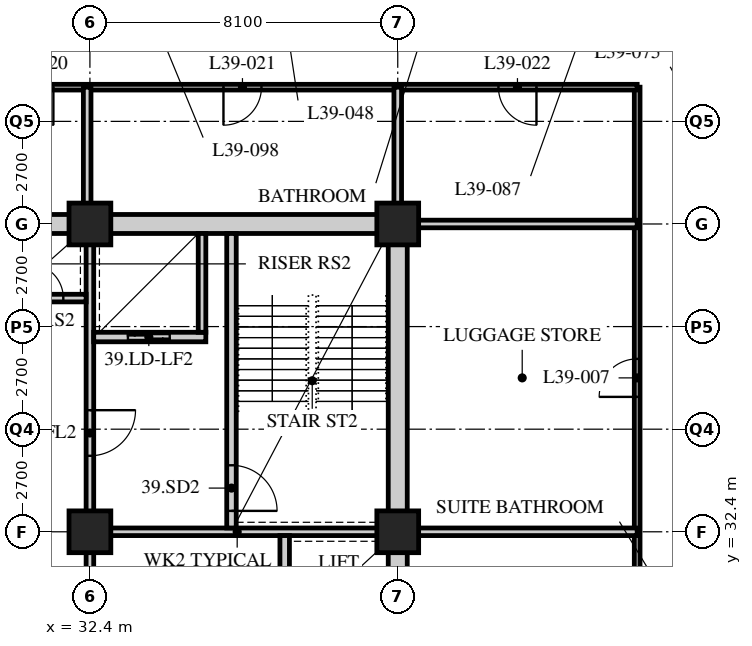
"""IFC4 building model, lengths in metres.
Left out: names, types, materials, properties, quantities, classifications, styles, units other than length and angle.
Written with IfcOpenShell. Run it as: python <this file> out.ifc"""

import sys

from ifc_helpers import new_model, si_unit, direction, frame, frame_2d, origin, origin_2d, place, context, subcontext, project, spatial, rectangle, hollow_rectangle, extrude, element, fill, save


model = new_model("IFC4")
c1 = context("Model", 3, precision=1e-05, world=origin(), true_north=direction((0.0, 1.0)))
c2 = subcontext(c1, "Body", "Model", "MODEL_VIEW")
j1 = project(units=[si_unit("LENGTHUNIT", "METRE"), si_unit("PLANEANGLEUNIT", "RADIAN")], contexts=[c1])
p1 = place(None, origin())
s1 = spatial("IfcSite", under=j1, at=p1, CompositionType="ELEMENT")
p2 = place(p1, origin())
s2 = spatial("IfcBuilding", under=s1, at=p2, CompositionType="ELEMENT")
p3 = place(p2, frame((0.0, 0.0, 151.0)))
s3 = spatial("IfcBuildingStorey", under=s2, at=p3, CompositionType="ELEMENT", Elevation=151.0)
for number, where, z_axis, x_axis in (
    (1, (32.4, 32.4, 0.0), (0.0, 0.0, 1.0), (1.0, 0.0, 0.0)),
    (2, (32.4, 40.5, 0.0), (0.0, 0.0, 1.0), (1.0, 0.0, 0.0)),
    (3, (40.5, 32.4, 0.0), (0.0, 0.0, 1.0), (1.0, 0.0, 0.0)),
    (4, (40.5, 40.5, 0.0), (0.0, 0.0, 1.0), (1.0, 0.0, 0.0)),
):
    element("IfcColumn", number, at=place(p3, frame(where, z_axis=z_axis, x_axis=x_axis)), inside=s3, PredefinedType="COLUMN", context=c2, shape_type="SweptSolid", body=[
        extrude(hollow_rectangle(XDim=1.1, YDim=1.1, WallThickness=0.1, at=origin_2d()), origin(), (0.0, 0.0, 1.0), 3.4),
    ])
p4 = place(p3, frame((46.8, 19.35, 0.0), z_axis=(0.0, 0.0, 1.0), x_axis=(0.0, 1.0, 0.0)))
e5 = element("IfcWall", 5, at=p4, inside=s3, PredefinedType="PARTITIONING", context=c2, shape_type="SweptSolid", body=[
    extrude(rectangle(XDim=24.75, YDim=0.15, at=frame_2d((12.375, 0.0))), origin(), (0.0, 0.0, 1.0), 3.19),
])
p5 = place(p4, frame((5.25, 0.0, 0.0)))
e6 = element("IfcOpeningElement", 6, at=p5, cuts=e5, PredefinedType="OPENING", context=c2, shape_type="SweptSolid", body=[
    extrude(rectangle(XDim=1.0, YDim=2.1, at=frame_2d((0.5, 1.05))), frame((0.0, 0.085, 0.0), z_axis=(0.0, -1.0, 0.0), x_axis=(1.0, 0.0, 0.0)), (0.0, 0.0, 1.0), 0.17),
])
p6 = place(p4, frame((9.3, 0.0, 0.0)))
e7 = element("IfcOpeningElement", 7, at=p6, cuts=e5, PredefinedType="OPENING", context=c2, shape_type="SweptSolid", body=[
    extrude(rectangle(XDim=1.0, YDim=2.1, at=frame_2d((0.5, 1.05))), frame((0.0, 0.085, 0.0), z_axis=(0.0, -1.0, 0.0), x_axis=(1.0, 0.0, 0.0)), (0.0, 0.0, 1.0), 0.17),
])
p7 = place(p4, frame((16.6, 0.0, 0.0)))
e8 = element("IfcOpeningElement", 8, at=p7, cuts=e5, PredefinedType="OPENING", context=c2, shape_type="SweptSolid", body=[
    extrude(rectangle(XDim=1.0, YDim=2.1, at=frame_2d((0.5, 1.05))), frame((0.0, 0.085, 0.0), z_axis=(0.0, -1.0, 0.0), x_axis=(1.0, 0.0, 0.0)), (0.0, 0.0, 1.0), 0.17),
])
p8 = place(p3, frame((46.8, 44.1, 0.0), z_axis=(0.0, 0.0, 1.0), x_axis=(-1.0, 0.0, 0.0)))
e9 = element("IfcWall", 9, at=p8, inside=s3, PredefinedType="PARTITIONING", context=c2, shape_type="SweptSolid", body=[
    extrude(rectangle(XDim=17.24, YDim=0.15, at=frame_2d((8.62, 0.0))), origin(), (0.0, 0.0, 1.0), 3.19),
])
p9 = place(p8, frame((15.361, 0.0, 0.0)))
e10 = element("IfcOpeningElement", 10, at=p9, cuts=e9, PredefinedType="OPENING", context=c2, shape_type="SweptSolid", body=[
    extrude(rectangle(XDim=1.0, YDim=2.1, at=frame_2d((0.5, 1.05))), frame((0.0, 0.085, 0.0), z_axis=(0.0, -1.0, 0.0), x_axis=(1.0, 0.0, 0.0)), (0.0, 0.0, 1.0), 0.17),
])
p10 = place(p8, frame((9.886, 0.0, 0.0)))
e11 = element("IfcOpeningElement", 11, at=p10, cuts=e9, PredefinedType="OPENING", context=c2, shape_type="SweptSolid", body=[
    extrude(rectangle(XDim=1.0, YDim=2.1, at=frame_2d((0.5, 1.05))), frame((0.0, 0.085, 0.0), z_axis=(0.0, -1.0, 0.0), x_axis=(1.0, 0.0, 0.0)), (0.0, 0.0, 1.0), 0.17),
])
p11 = place(p8, frame((2.65, 0.0, 0.0)))
e12 = element("IfcOpeningElement", 12, at=p11, cuts=e9, PredefinedType="OPENING", context=c2, shape_type="SweptSolid", body=[
    extrude(rectangle(XDim=1.0, YDim=2.1, at=frame_2d((0.5, 1.05))), frame((0.0, 0.085, 0.0), z_axis=(0.0, -1.0, 0.0), x_axis=(1.0, 0.0, 0.0)), (0.0, 0.0, 1.0), 0.17),
])
p12 = place(p3, frame((40.5, 32.4, 0.0), z_axis=(0.0, 0.0, 1.0), x_axis=(1.0, 0.0, 0.0)))
e13 = element("IfcWall", 13, at=p12, inside=s3, PredefinedType="SOLIDWALL", context=c2, shape_type="SweptSolid", body=[
    extrude(rectangle(XDim=6.3, YDim=0.2, at=frame_2d((3.15, 0.0))), origin(), (0.0, 0.0, 1.0), 3.19),
])
for number, where, z_axis, x_axis in (
    (14, (40.5, 40.5, 0.0), (0.0, 0.0, 1.0), (0.0, 1.0, 0.0)),
    (15, (32.328, 44.1, 0.0), (0.0, 0.0, 1.0), (0.0, -1.0, 0.0)),
):
    element("IfcWall", number, at=place(p3, frame(where, z_axis=z_axis, x_axis=x_axis)), inside=s3, PredefinedType="SOLIDWALL", context=c2, shape_type="SweptSolid", body=[
        extrude(rectangle(XDim=3.6, YDim=0.2, at=frame_2d((1.8, 0.0))), origin(), (0.0, 0.0, 1.0), 2.42),
    ])
p13 = place(p3, frame((40.5, 40.5, 0.0), z_axis=(0.0, 0.0, 1.0), x_axis=(1.0, 0.0, 0.0)))
e16 = element("IfcWall", 16, at=p13, inside=s3, PredefinedType="SOLIDWALL", context=c2, shape_type="SweptSolid", body=[
    extrude(rectangle(XDim=6.3, YDim=0.2, at=frame_2d((3.15, 0.0))), origin(), (0.0, 0.0, 1.0), 3.19),
])
p14 = place(p3, frame((15.95, 40.5, 0.0), z_axis=(0.0, 0.0, 1.0), x_axis=(1.0, 0.0, 0.0)))
e17 = element("IfcWall", 17, at=p14, inside=s3, PredefinedType="SOLIDWALL", context=c2, shape_type="SweptSolid", body=[
    extrude(rectangle(XDim=24.8, YDim=0.5, at=frame_2d((12.4, 0.0))), origin(), (0.0, 0.0, 1.0), 2.42),
])
p15 = place(p14, frame((11.5, 0.0, 0.0)))
e18 = element("IfcOpeningElement", 18, at=p15, cuts=e17, PredefinedType="OPENING", context=c2, shape_type="SweptSolid", body=[
    extrude(rectangle(XDim=1.8, YDim=2.4, at=frame_2d((0.9, 1.2))), frame((0.0, 0.26, 0.0), z_axis=(0.0, -1.0, 0.0), x_axis=(1.0, 0.0, 0.0)), (0.0, 0.0, 1.0), 0.52),
])
p16 = place(p3, frame((40.5, 24.55, 0.0), z_axis=(0.0, 0.0, 1.0), x_axis=(0.0, 1.0, 0.0)))
e19 = element("IfcWall", 19, at=p16, inside=s3, PredefinedType="SOLIDWALL", context=c2, shape_type="SweptSolid", body=[
    extrude(rectangle(XDim=15.7, YDim=0.5, at=frame_2d((7.85, 0.0))), origin(), (0.0, 0.0, 1.0), 2.42),
])
p17 = place(p3, frame((32.3, 32.4, 0.0), z_axis=(0.0, 0.0, 1.0), x_axis=(1.0, 0.0, 0.0)))
e20 = element("IfcWall", 20, at=p17, inside=s3, PredefinedType="SOLIDWALL", context=c2, shape_type="SweptSolid", body=[
    extrude(rectangle(XDim=7.95, YDim=0.2, at=frame_2d((3.975, 0.0))), origin(), (0.0, 0.0, 1.0), 2.578),
])
p18 = place(p3, frame((32.4, 32.5, 0.0), z_axis=(0.0, 0.0, 1.0), x_axis=(0.0, 1.0, 0.0)))
e21 = element("IfcWall", 21, at=p18, inside=s3, PredefinedType="SOLIDWALL", context=c2, shape_type="SweptSolid", body=[
    extrude(rectangle(XDim=7.75, YDim=0.2, at=frame_2d((3.875, 0.0))), origin(), (0.0, 0.0, 1.0), 2.578),
])
p19 = place(p18, frame((1.9, 0.0, 0.0)))
e22 = element("IfcOpeningElement", 22, at=p19, cuts=e21, PredefinedType="OPENING", context=c2, shape_type="SweptSolid", body=[
    extrude(rectangle(XDim=1.2, YDim=2.1, at=frame_2d((0.6, 1.05))), frame((0.0, 0.11, 0.0), z_axis=(0.0, -1.0, 0.0), x_axis=(1.0, 0.0, 0.0)), (0.0, 0.0, 1.0), 0.22),
])
p20 = place(p3, frame((37.525, 24.55, 0.0), z_axis=(0.0, 0.0, 1.0), x_axis=(0.0, 1.0, 0.0)))
e23 = element("IfcWall", 23, at=p20, inside=s3, PredefinedType="SOLIDWALL", context=c2, shape_type="SweptSolid", body=[
    extrude(rectangle(XDim=7.75, YDim=0.25, at=frame_2d((3.875, 0.0))), origin(), (0.0, 0.0, 1.0), 3.19),
])
p21 = place(p3, frame((36.125, 32.5, 0.0), z_axis=(0.0, 0.0, 1.0), x_axis=(0.0, 1.0, 0.0)))
e24 = element("IfcWall", 24, at=p21, inside=s3, PredefinedType="SOLIDWALL", context=c2, shape_type="SweptSolid", body=[
    extrude(rectangle(XDim=7.75, YDim=0.25, at=frame_2d((3.875, 0.0))), origin(), (0.0, 0.0, 1.0), 3.19),
])
p22 = place(p21, frame((0.45, 0.0, 0.0)))
e25 = element("IfcOpeningElement", 25, at=p22, cuts=e24, PredefinedType="OPENING", context=c2, shape_type="SweptSolid", body=[
    extrude(rectangle(XDim=1.2, YDim=2.1, at=frame_2d((0.6, 1.05))), frame((0.0, 0.135, 0.0), z_axis=(0.0, -1.0, 0.0), x_axis=(1.0, 0.0, 0.0)), (0.0, 0.0, 1.0), 0.27),
])
p23 = place(p3, frame((32.5, 37.525, 0.0), z_axis=(0.0, 0.0, 1.0), x_axis=(1.0, 0.0, 0.0)))
e26 = element("IfcWall", 26, at=p23, inside=s3, PredefinedType="SOLIDWALL", context=c2, shape_type="SweptSolid", body=[
    extrude(rectangle(XDim=2.95, YDim=0.25, at=frame_2d((1.475, 0.0))), origin(), (0.0, 0.0, 1.0), 3.19),
])
p24 = place(p23, frame((0.9, 0.0, 0.0)))
e27 = element("IfcOpeningElement", 27, at=p24, cuts=e26, PredefinedType="OPENING", context=c2, shape_type="SweptSolid", body=[
    extrude(rectangle(XDim=1.1, YDim=2.4, at=frame_2d((0.55, 1.2))), frame((0.0, 0.135, 0.0), z_axis=(0.0, -1.0, 0.0), x_axis=(1.0, 0.0, 0.0)), (0.0, 0.0, 1.0), 0.27),
])
p25 = place(p3, frame((35.35, 37.65, 0.0), z_axis=(0.0, 0.0, 1.0), x_axis=(0.0, 1.0, 0.0)))
e28 = element("IfcWall", 28, at=p25, inside=s3, PredefinedType="SOLIDWALL", context=c2, shape_type="SweptSolid", body=[
    extrude(rectangle(XDim=2.6, YDim=0.2, at=frame_2d((1.3, 0.0))), origin(), (0.0, 0.0, 1.0), 3.19),
])
p26 = place(p3, frame((30.15, 38.55, 0.0), z_axis=(0.0, 0.0, 1.0), x_axis=(1.0, 0.0, 0.0)))
e29 = element("IfcWall", 29, at=p26, inside=s3, PredefinedType="SOLIDWALL", context=c2, shape_type="SweptSolid", body=[
    extrude(rectangle(XDim=2.15, YDim=0.2, at=frame_2d((1.075, 0.0))), origin(), (0.0, 0.0, 1.0), 3.19),
])
p27 = place(p26, frame((0.65, 0.0, 0.0)))
e30 = element("IfcOpeningElement", 30, at=p27, cuts=e29, PredefinedType="OPENING", context=c2, shape_type="SweptSolid", body=[
    extrude(rectangle(XDim=0.9, YDim=2.1, at=frame_2d((0.45, 1.05))), frame((0.0, 0.11, 0.0), z_axis=(0.0, -1.0, 0.0), x_axis=(1.0, 0.0, 0.0)), (0.0, 0.0, 1.0), 0.22),
])
p28 = place(p3, frame((32.4, 24.55, 0.0), z_axis=(0.0, 0.0, 1.0), x_axis=(0.0, 1.0, 0.0)))
e31 = element("IfcWall", 31, at=p28, inside=s3, PredefinedType="PARTITIONING", context=c2, shape_type="SweptSolid", body=[
    extrude(rectangle(XDim=7.75, YDim=0.2, at=frame_2d((3.875, 0.0))), origin(), (0.0, 0.0, 1.0), 2.578),
])
p29 = place(p28, frame((0.925, 0.0, 0.0)))
e32 = element("IfcOpeningElement", 32, at=p29, cuts=e31, PredefinedType="OPENING", context=c2, shape_type="SweptSolid", body=[
    extrude(rectangle(XDim=0.9, YDim=2.1, at=frame_2d((0.45, 1.05))), frame((0.0, 0.11, 0.0), z_axis=(0.0, -1.0, 0.0), x_axis=(1.0, 0.0, 0.0)), (0.0, 0.0, 1.0), 0.22),
])
p30 = place(p28, frame((3.275, 0.0, 0.0)))
e33 = element("IfcOpeningElement", 33, at=p30, cuts=e31, PredefinedType="OPENING", context=c2, shape_type="SweptSolid", body=[
    extrude(rectangle(XDim=1.0, YDim=2.1, at=frame_2d((0.5, 1.05))), frame((0.0, 0.11, 0.0), z_axis=(0.0, -1.0, 0.0), x_axis=(1.0, 0.0, 0.0)), (0.0, 0.0, 1.0), 0.22),
])
p31 = place(p28, frame((5.775, 0.0, 0.0)))
e34 = element("IfcOpeningElement", 34, at=p31, cuts=e31, PredefinedType="OPENING", context=c2, shape_type="SweptSolid", body=[
    extrude(rectangle(XDim=1.0, YDim=2.1, at=frame_2d((0.5, 1.05))), frame((0.0, 0.11, 0.0), z_axis=(0.0, -1.0, 0.0), x_axis=(1.0, 0.0, 0.0)), (0.0, 0.0, 1.0), 0.22),
])
p32 = place(p7, origin())
e35 = element("IfcDoor", 35, at=p32, inside=s3, OperationType="SINGLE_SWING_LEFT", PredefinedType="DOOR", context=c2, shape_type="SweptSolid", body=[
    extrude(rectangle(XDim=1.0, YDim=2.1, at=frame_2d((0.5, 1.05))), frame((0.0, 0.025, 0.0), z_axis=(0.0, -1.0, 0.0), x_axis=(1.0, 0.0, 0.0)), (0.0, 0.0, 1.0), 0.05),
])
fill(e8, e35)
p33 = place(p9, origin())
e36 = element("IfcDoor", 36, at=p33, inside=s3, OperationType="SINGLE_SWING_LEFT", PredefinedType="DOOR", context=c2, shape_type="SweptSolid", body=[
    extrude(rectangle(XDim=1.0, YDim=2.1, at=frame_2d((0.5, 1.05))), frame((0.0, 0.025, 0.0), z_axis=(0.0, -1.0, 0.0), x_axis=(1.0, 0.0, 0.0)), (0.0, 0.0, 1.0), 0.05),
])
fill(e10, e36)
p34 = place(p10, origin())
e37 = element("IfcDoor", 37, at=p34, inside=s3, OperationType="SINGLE_SWING_RIGHT", PredefinedType="DOOR", context=c2, shape_type="SweptSolid", body=[
    extrude(rectangle(XDim=1.0, YDim=2.1, at=frame_2d((0.5, 1.05))), frame((0.0, 0.025, 0.0), z_axis=(0.0, -1.0, 0.0), x_axis=(1.0, 0.0, 0.0)), (0.0, 0.0, 1.0), 0.05),
])
fill(e11, e37)
p35 = place(p11, origin())
e38 = element("IfcDoor", 38, at=p35, inside=s3, OperationType="SINGLE_SWING_LEFT", PredefinedType="DOOR", context=c2, shape_type="SweptSolid", body=[
    extrude(rectangle(XDim=1.0, YDim=2.1, at=frame_2d((0.5, 1.05))), frame((0.0, 0.025, 0.0), z_axis=(0.0, -1.0, 0.0), x_axis=(1.0, 0.0, 0.0)), (0.0, 0.0, 1.0), 0.05),
])
fill(e12, e38)
p36 = place(p22, origin())
e39 = element("IfcDoor", 39, at=p36, inside=s3, OperationType="SINGLE_SWING_RIGHT", PredefinedType="DOOR", context=c2, shape_type="SweptSolid", body=[
    extrude(rectangle(XDim=1.2, YDim=2.1, at=frame_2d((0.6, 1.05))), frame((0.0, 0.025, 0.0), z_axis=(0.0, -1.0, 0.0), x_axis=(1.0, 0.0, 0.0)), (0.0, 0.0, 1.0), 0.05),
])
fill(e25, e39)
p37 = place(p19, origin())
e40 = element("IfcDoor", 40, at=p37, inside=s3, OperationType="SINGLE_SWING_LEFT", PredefinedType="DOOR", context=c2, shape_type="SweptSolid", body=[
    extrude(rectangle(XDim=1.2, YDim=2.1, at=frame_2d((0.6, 1.05))), frame((0.0, 0.025, 0.0), z_axis=(0.0, -1.0, 0.0), x_axis=(1.0, 0.0, 0.0)), (0.0, 0.0, 1.0), 0.05),
])
fill(e22, e40)
p38 = place(p27, origin())
e41 = element("IfcDoor", 41, at=p38, inside=s3, OperationType="SINGLE_SWING_LEFT", PredefinedType="DOOR", context=c2, shape_type="SweptSolid", body=[
    extrude(rectangle(XDim=0.9, YDim=2.1, at=frame_2d((0.45, 1.05))), frame((0.0, 0.025, 0.0), z_axis=(0.0, -1.0, 0.0), x_axis=(1.0, 0.0, 0.0)), (0.0, 0.0, 1.0), 0.05),
])
fill(e30, e41)
p39 = place(p24, origin())
e42 = element("IfcDoor", 42, at=p39, inside=s3, OperationType="DOUBLE_DOOR_SLIDING", PredefinedType="DOOR", context=c2, shape_type="SweptSolid", body=[
    extrude(rectangle(XDim=1.1, YDim=2.4, at=frame_2d((0.55, 1.2))), frame((0.0, 0.025, 0.0), z_axis=(0.0, -1.0, 0.0), x_axis=(1.0, 0.0, 0.0)), (0.0, 0.0, 1.0), 0.05),
])
fill(e27, e42)
save(model, sys.argv[1])
